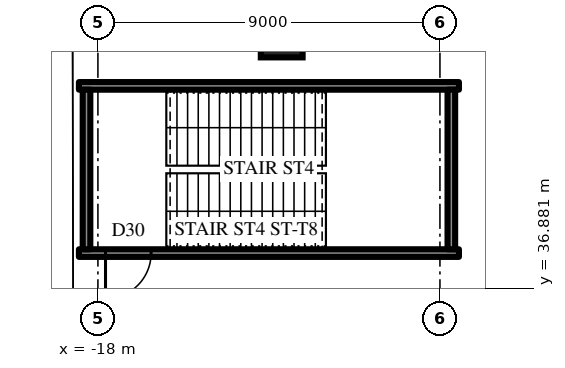
"""IFC4 building model, lengths in metres.
Left out: names, types, materials, properties, quantities, classifications, styles, units other than length and angle.
Written with IfcOpenShell. Run it as: python <this file> out.ifc"""

import sys

from ifc_helpers import new_model, si_unit, direction, frame, frame_2d, origin, origin_2d, place, context, subcontext, project, spatial, rectangle, extrude, element, fill, save


model = new_model("IFC4")
c1 = context("Model", 3, precision=1e-05, world=origin(), true_north=direction((0.0, 1.0)))
c2 = subcontext(c1, "Body", "Model", "MODEL_VIEW")
j1 = project(units=[si_unit("LENGTHUNIT", "METRE"), si_unit("PLANEANGLEUNIT", "RADIAN")], contexts=[c1])
p1 = place(None, origin())
s1 = spatial("IfcSite", under=j1, at=p1, CompositionType="ELEMENT")
p2 = place(p1, origin())
s2 = spatial("IfcBuilding", under=s1, at=p2, CompositionType="ELEMENT")
p3 = place(p2, frame((0.0, 0.0, 13.0)))
s3 = spatial("IfcBuildingStorey", under=s2, at=p3, CompositionType="ELEMENT", Elevation=13.0)
p4 = place(p3, frame((-18.5, 37.8, 0.0), z_axis=(0.0, 0.0, 1.0), x_axis=(1.0, 0.0, 0.0)))
e1 = element("IfcWall", 1, at=p4, inside=s3, PredefinedType="SHEAR", context=c2, shape_type="SweptSolid", body=[
    extrude(rectangle(XDim=10.0, YDim=0.2, at=frame_2d((5.0, 0.0))), origin(), (0.0, 0.0, 1.0), 5.5),
])
p5 = place(p4, frame((0.7, 0.0, 0.0)))
e2 = element("IfcOpeningElement", 2, at=p5, cuts=e1, PredefinedType="OPENING", context=c2, shape_type="SweptSolid", body=[
    extrude(rectangle(XDim=1.2, YDim=2.2, at=frame_2d((0.6, 1.1))), frame((0.0, 0.11, 0.0), z_axis=(0.0, -1.0, 0.0), x_axis=(1.0, 0.0, 0.0)), (0.0, 0.0, 1.0), 0.22),
])
p6 = place(p3, frame((-8.5, 42.2, 0.0), z_axis=(0.0, 0.0, 1.0), x_axis=(-1.0, 0.0, 0.0)))
e3 = element("IfcWall", 3, at=p6, inside=s3, PredefinedType="SHEAR", context=c2, shape_type="SweptSolid", body=[
    extrude(rectangle(XDim=10.0, YDim=0.2, at=frame_2d((5.0, 0.0))), origin(), (0.0, 0.0, 1.0), 5.5),
])
for number, where, z_axis, x_axis in (
    (4, (-18.3, 42.1, 0.0), (0.0, 0.0, 1.0), (0.0, -1.0, 0.0)),
    (5, (-8.7, 37.9, 0.0), (0.0, 0.0, 1.0), (0.0, 1.0, 0.0)),
):
    element("IfcWall", number, at=place(p3, frame(where, z_axis=z_axis, x_axis=x_axis)), inside=s3, PredefinedType="SHEAR", context=c2, shape_type="SweptSolid", body=[
        extrude(rectangle(XDim=4.2, YDim=0.2, at=frame_2d((2.1, 0.0))), origin(), (0.0, 0.0, 1.0), 5.5),
    ])
p7 = place(p3, frame((-13.164, 43.5, 0.0), z_axis=(0.0, 0.0, 1.0), x_axis=(-1.0, 0.0, 0.0)))
e6 = element("IfcColumn", 6, at=p7, inside=s3, PredefinedType="COLUMN", context=c2, shape_type="SweptSolid", body=[
    extrude(rectangle(XDim=1.1, YDim=1.1, at=origin_2d()), origin(), (0.0, 0.0, 1.0), 5.5),
])
p8 = place(p5, frame((1.2, 0.0, 0.0), z_axis=(0.0, 0.0, 1.0), x_axis=(-1.0, 0.0, 0.0)))
e7 = element("IfcDoor", 7, at=p8, inside=s3, OperationType="SINGLE_SWING_LEFT", PredefinedType="DOOR", context=c2, shape_type="SweptSolid", body=[
    extrude(rectangle(XDim=1.2, YDim=2.2, at=frame_2d((0.6, 1.1))), frame((0.0, 0.025, 0.0), z_axis=(0.0, -1.0, 0.0), x_axis=(1.0, 0.0, 0.0)), (0.0, 0.0, 1.0), 0.05),
])
fill(e2, e7)
save(model, sys.argv[1])
